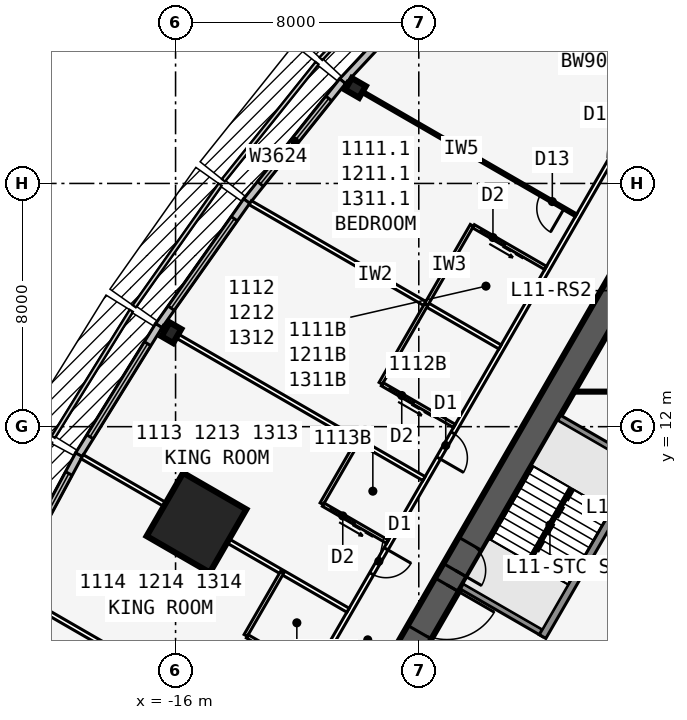
"""IFC4 building model, lengths in metres.
Left out: names, types, materials, properties, quantities, classifications, styles, units other than length and angle.
Written with IfcOpenShell. Run it as: python <this file> out.ifc"""

import sys

from ifc_helpers import new_model, si_unit, direction, frame, frame_2d, origin, origin_2d, place, context, subcontext, project, spatial, rectangle, i_section, extrude, element, fill, save


model = new_model("IFC4")
c1 = context("Model", 3, precision=1e-05, world=origin(), true_north=direction((0.0, 1.0)))
c2 = subcontext(c1, "Body", "Model", "MODEL_VIEW")
j1 = project(units=[si_unit("LENGTHUNIT", "METRE"), si_unit("PLANEANGLEUNIT", "RADIAN")], contexts=[c1])
p1 = place(None, origin())
s1 = spatial("IfcSite", under=j1, at=p1, CompositionType="ELEMENT")
p2 = place(p1, origin())
s2 = spatial("IfcBuilding", under=s1, at=p2, CompositionType="ELEMENT")
p3 = place(p2, frame((0.0, 0.0, 48.9)))
s3 = spatial("IfcBuildingStorey", under=s2, at=p3, CompositionType="ELEMENT", Elevation=48.9)
p4 = place(p3, frame((0.0, 19.052, 0.0), z_axis=(0.0, 0.0, 1.0), x_axis=(-0.499999749417, -0.866025548458, 0.0)))
e1 = element("IfcWall", 1, at=p4, inside=s3, PredefinedType="SHEAR", context=c2, shape_type="SweptSolid", body=[
    extrude(rectangle(XDim=33.0, YDim=0.9, at=frame_2d((16.5, 0.0))), origin(), (0.0, 0.0, 1.0), 3.4),
])
p5 = place(p4, frame((14.15, 0.0, 0.0)))
e2 = element("IfcOpeningElement", 2, at=p5, cuts=e1, PredefinedType="OPENING", context=c2, shape_type="SweptSolid", body=[
    extrude(rectangle(XDim=1.8, YDim=2.13, at=frame_2d((0.9, 1.065))), frame((0.0, 0.46, 0.0), z_axis=(0.0, -1.0, 0.0), x_axis=(1.0, 0.0, 0.0)), (0.0, 0.0, 1.0), 0.92),
])
p6 = place(p4, frame((12.6, 0.0, 0.0)))
e3 = element("IfcOpeningElement", 3, at=p6, cuts=e1, PredefinedType="OPENING", context=c2, shape_type="SweptSolid", body=[
    extrude(rectangle(XDim=1.0, YDim=2.13, at=frame_2d((0.5, 1.065))), frame((0.0, 0.46, 0.0), z_axis=(0.0, -1.0, 0.0), x_axis=(1.0, 0.0, 0.0)), (0.0, 0.0, 1.0), 0.92),
])
p7 = place(p3, frame((-0.062, 11.794, 0.0), z_axis=(0.0, 0.0, 1.0), x_axis=(-0.500006680225, -0.86602154692, 0.0)))
e4 = element("IfcWall", 4, at=p7, inside=s3, PredefinedType="SOLIDWALL", context=c2, shape_type="SweptSolid", body=[
    extrude(rectangle(XDim=7.733, YDim=0.25, at=frame_2d((3.866, 0.0))), origin(), (0.0, 0.0, 1.0), 3.235),
])
for number, where, z_axis, x_axis in (
    (5, (-0.679, 10.727, 0.0), (0.0, 0.0, 1.0), (-0.866, 0.5, 0.0)),
    (6, (-3.879, 5.184, 0.0), (0.0, 0.0, 1.0), (-0.866, 0.5, 0.0)),
):
    element("IfcWall", number, at=place(p3, frame(where, z_axis=z_axis, x_axis=x_axis)), inside=s3, PredefinedType="SOLIDWALL", context=c2, shape_type="SweptSolid", body=[
        extrude(rectangle(XDim=3.125, YDim=0.2, at=frame_2d((1.562, 0.0))), origin(), (0.0, 0.0, 1.0), 3.235),
    ])
for number, where, z_axis, x_axis in (
    (7, (-10.083, 23.142, 0.0), (0.0, 0.0, 1.0), (-0.5, -0.866, 0.0)),
    (8, (-16.137, 15.09, 0.0), (0.0, 0.0, 1.0), (-0.866, 0.5, 0.0)),
):
    element("IfcColumn", number, at=place(p3, frame(where, z_axis=z_axis, x_axis=x_axis)), inside=s3, PredefinedType="COLUMN", context=c2, shape_type="SweptSolid", body=[
        extrude(i_section(OverallWidth=0.442, OverallDepth=0.531, WebThickness=0.066, FlangeThickness=0.106, at=origin_2d()), origin(), (0.0, 0.0, 1.0), 3.4),
    ])
p8 = place(p3, frame((-15.312, 8.84, 0.0), z_axis=(0.0, 0.0, 1.0), x_axis=(-0.866025403784, 0.5, 0.0)))
e9 = element("IfcColumn", 9, at=p8, inside=s3, PredefinedType="COLUMN", context=c2, shape_type="SweptSolid", body=[
    extrude(rectangle(XDim=2.4, YDim=2.4, at=origin_2d()), origin(), (0.0, 0.0, 1.0), 3.4),
])
p9 = place(p3, frame((-4.909, 29.36, 0.0), z_axis=(0.0, 0.0, 1.0), x_axis=(-0.682289646561, -0.731081964075, 0.0)))
e10 = element("IfcWall", 10, at=p9, inside=s3, PredefinedType="STANDARD", context=c2, shape_type="SweptSolid", body=[
    extrude(rectangle(XDim=8.211, YDim=0.25, at=frame_2d((4.105, 0.0))), origin(), (0.0, 0.0, 1.0), 3.235),
])
p10 = place(p9, frame((2.006, 0.0, 0.45)))
e11 = element("IfcOpeningElement", 11, at=p10, cuts=e10, PredefinedType="OPENING", context=c2, shape_type="SweptSolid", body=[
    extrude(rectangle(XDim=4.2, YDim=2.4, at=frame_2d((2.1, 1.2))), frame((0.0, 0.135, 0.0), z_axis=(0.0, -1.0, 0.0), x_axis=(1.0, 0.0, 0.0)), (0.0, 0.0, 1.0), 0.27),
])
p11 = place(p3, frame((-10.505, 23.364, 0.0), z_axis=(0.0, 0.0, 1.0), x_axis=(-0.624594965756, -0.780948864364, 0.0)))
e12 = element("IfcWall", 12, at=p11, inside=s3, PredefinedType="STANDARD", context=c2, shape_type="SweptSolid", body=[
    extrude(rectangle(XDim=5.058, YDim=0.25, at=frame_2d((2.529, 0.0))), origin(), (0.0, 0.0, 1.0), 3.235),
])
p12 = place(p11, frame((0.729, 0.0, 0.45)))
e13 = element("IfcOpeningElement", 13, at=p12, cuts=e12, PredefinedType="OPENING", context=c2, shape_type="SweptSolid", body=[
    extrude(rectangle(XDim=3.6, YDim=2.4, at=frame_2d((1.8, 1.2))), frame((0.0, 0.135, 0.0), z_axis=(0.0, -1.0, 0.0), x_axis=(1.0, 0.0, 0.0)), (0.0, 0.0, 1.0), 0.27),
])
p13 = place(p3, frame((-13.659, 19.42, 0.0), z_axis=(0.0, 0.0, 1.0), x_axis=(-0.5766431066, -0.81699616132, 0.0)))
e14 = element("IfcWall", 14, at=p13, inside=s3, PredefinedType="STANDARD", context=c2, shape_type="SweptSolid", body=[
    extrude(rectangle(XDim=5.021, YDim=0.25, at=frame_2d((2.51, 0.0))), origin(), (0.0, 0.0, 1.0), 3.235),
])
p14 = place(p13, frame((0.71, 0.0, 0.45)))
e15 = element("IfcOpeningElement", 15, at=p14, cuts=e14, PredefinedType="OPENING", context=c2, shape_type="SweptSolid", body=[
    extrude(rectangle(XDim=3.6, YDim=2.4, at=frame_2d((1.8, 1.2))), frame((0.0, 0.135, 0.0), z_axis=(0.0, -1.0, 0.0), x_axis=(1.0, 0.0, 0.0)), (0.0, 0.0, 1.0), 0.27),
])
p15 = place(p3, frame((-16.551, 15.324, 0.0), z_axis=(0.0, 0.0, 1.0), x_axis=(-0.526132807704, -0.850402415717, 0.0)))
e16 = element("IfcWall", 16, at=p15, inside=s3, PredefinedType="STANDARD", context=c2, shape_type="SweptSolid", body=[
    extrude(rectangle(XDim=5.002, YDim=0.25, at=frame_2d((2.501, 0.0))), origin(), (0.0, 0.0, 1.0), 3.235),
])
p16 = place(p15, frame((0.701, 0.0, 0.45)))
e17 = element("IfcOpeningElement", 17, at=p16, cuts=e16, PredefinedType="OPENING", context=c2, shape_type="SweptSolid", body=[
    extrude(rectangle(XDim=3.6, YDim=2.4, at=frame_2d((1.8, 1.2))), frame((0.0, 0.135, 0.0), z_axis=(0.0, -1.0, 0.0), x_axis=(1.0, 0.0, 0.0)), (0.0, 0.0, 1.0), 0.27),
])
p17 = place(p3, frame((-19.178, 11.077, 0.0), z_axis=(0.0, 0.0, 1.0), x_axis=(-0.473412820489, -0.880840678782, 0.0)))
e18 = element("IfcWall", 18, at=p17, inside=s3, PredefinedType="STANDARD", context=c2, shape_type="SweptSolid", body=[
    extrude(rectangle(XDim=5.002, YDim=0.25, at=frame_2d((2.501, 0.0))), origin(), (0.0, 0.0, 1.0), 3.235),
])
p18 = place(p17, frame((0.701, 0.0, 0.45)))
e19 = element("IfcOpeningElement", 19, at=p18, cuts=e18, PredefinedType="OPENING", context=c2, shape_type="SweptSolid", body=[
    extrude(rectangle(XDim=3.6, YDim=2.4, at=frame_2d((1.8, 1.2))), frame((0.0, 0.135, 0.0), z_axis=(0.0, -1.0, 0.0), x_axis=(1.0, 0.0, 0.0)), (0.0, 0.0, 1.0), 0.27),
])
p19 = place(p3, frame((-0.5, 22.836, 0.0), z_axis=(0.0, 0.0, 1.0), x_axis=(-0.500001677587, -0.866024435227, 0.0)))
e20 = element("IfcWall", 20, at=p19, inside=s3, PredefinedType="PARTITIONING", context=c2, shape_type="SweptSolid", body=[
    extrude(rectangle(XDim=39.054, YDim=0.15, at=frame_2d((19.527, 0.0))), origin(), (0.0, 0.0, 1.0), 3.235),
])
p20 = place(p19, frame((1.558, 0.0, 0.0)))
e21 = element("IfcOpeningElement", 21, at=p20, cuts=e20, PredefinedType="OPENING", context=c2, shape_type="SweptSolid", body=[
    extrude(rectangle(XDim=0.95, YDim=2.13, at=frame_2d((0.475, 1.065))), frame((0.0, 0.085, 0.0), z_axis=(0.0, -1.0, 0.0), x_axis=(1.0, 0.0, 0.0)), (0.0, 0.0, 1.0), 0.17),
])
p21 = place(p19, frame((12.752, 0.0, 0.0)))
e22 = element("IfcOpeningElement", 22, at=p21, cuts=e20, PredefinedType="OPENING", context=c2, shape_type="SweptSolid", body=[
    extrude(rectangle(XDim=0.95, YDim=2.13, at=frame_2d((0.475, 1.065))), frame((0.0, 0.085, 0.0), z_axis=(0.0, -1.0, 0.0), x_axis=(1.0, 0.0, 0.0)), (0.0, 0.0, 1.0), 0.17),
])
p22 = place(p19, frame((17.152, 0.0, 0.0)))
e23 = element("IfcOpeningElement", 23, at=p22, cuts=e20, PredefinedType="OPENING", context=c2, shape_type="SweptSolid", body=[
    extrude(rectangle(XDim=0.95, YDim=2.13, at=frame_2d((0.475, 1.065))), frame((0.0, 0.085, 0.0), z_axis=(0.0, -1.0, 0.0), x_axis=(1.0, 0.0, 0.0)), (0.0, 0.0, 1.0), 0.17),
])
p23 = place(p19, frame((22.152, 0.0, 0.0)))
e24 = element("IfcOpeningElement", 24, at=p23, cuts=e20, PredefinedType="OPENING", context=c2, shape_type="SweptSolid", body=[
    extrude(rectangle(XDim=0.95, YDim=2.13, at=frame_2d((0.475, 1.065))), frame((0.0, 0.085, 0.0), z_axis=(0.0, -1.0, 0.0), x_axis=(1.0, 0.0, 0.0)), (0.0, 0.0, 1.0), 0.17),
])
p24 = place(p19, frame((27.152, 0.0, 0.0)))
e25 = element("IfcOpeningElement", 25, at=p24, cuts=e20, PredefinedType="OPENING", context=c2, shape_type="SweptSolid", body=[
    extrude(rectangle(XDim=0.95, YDim=2.13, at=frame_2d((0.475, 1.065))), frame((0.0, 0.085, 0.0), z_axis=(0.0, -1.0, 0.0), x_axis=(1.0, 0.0, 0.0)), (0.0, 0.0, 1.0), 0.17),
])
p25 = place(p19, frame((36.546, 0.0, 0.0)))
e26 = element("IfcOpeningElement", 26, at=p25, cuts=e20, PredefinedType="OPENING", context=c2, shape_type="SweptSolid", body=[
    extrude(rectangle(XDim=0.95, YDim=2.13, at=frame_2d((0.475, 1.065))), frame((0.0, 0.085, 0.0), z_axis=(0.0, -1.0, 0.0), x_axis=(1.0, 0.0, 0.0)), (0.0, 0.0, 1.0), 0.17),
])
p26 = place(p3, frame((-2.829, 18.954, 0.0), z_axis=(0.0, 0.0, 1.0), x_axis=(-0.866020536561, 0.500008430184, 0.0)))
e27 = element("IfcWall", 27, at=p26, inside=s3, PredefinedType="PARTITIONING", context=c2, shape_type="SweptSolid", body=[
    extrude(rectangle(XDim=8.72, YDim=0.1, at=frame_2d((4.36, 0.0))), origin(), (0.0, 0.0, 1.0), 2.389),
])
p27 = place(p26, frame((0.45, 0.0, 0.0)))
e28 = element("IfcOpeningElement", 28, at=p27, cuts=e27, PredefinedType="OPENING", context=c2, shape_type="SweptSolid", body=[
    extrude(rectangle(XDim=0.9, YDim=2.13, at=frame_2d((0.45, 1.065))), frame((0.0, 0.06, 0.0), z_axis=(0.0, -1.0, 0.0), x_axis=(1.0, 0.0, 0.0)), (0.0, 0.0, 1.0), 0.12),
])
p28 = place(p3, frame((-5.329, 14.623, 0.0), z_axis=(0.0, 0.0, 1.0), x_axis=(-0.866018409083, 0.500012114982, 0.0)))
e29 = element("IfcWall", 29, at=p28, inside=s3, PredefinedType="PARTITIONING", context=c2, shape_type="SweptSolid", body=[
    extrude(rectangle(XDim=9.485, YDim=0.15, at=frame_2d((4.742, 0.0))), origin(), (0.0, 0.0, 1.0), 2.389),
])
p29 = place(p3, frame((-7.829, 10.293, 0.0), z_axis=(0.0, 0.0, 1.0), x_axis=(-0.866016302457, 0.50001576363, 0.0)))
e30 = element("IfcWall", 30, at=p29, inside=s3, PredefinedType="PARTITIONING", context=c2, shape_type="SweptSolid", body=[
    extrude(rectangle(XDim=9.943, YDim=0.15, at=frame_2d((4.972, 0.0))), origin(), (0.0, 0.0, 1.0), 2.389),
])
p30 = place(p3, frame((-10.329, 5.963, 0.0), z_axis=(0.0, 0.0, 1.0), x_axis=(-0.866021688545, 0.500006434927, 0.0)))
e31 = element("IfcWall", 31, at=p30, inside=s3, PredefinedType="PARTITIONING", context=c2, shape_type="SweptSolid", body=[
    extrude(rectangle(XDim=10.096, YDim=0.15, at=frame_2d((5.048, 0.0))), origin(), (0.0, 0.0, 1.0), 2.389),
])
p31 = place(p3, frame((-12.829, 1.633, 0.0), z_axis=(0.0, 0.0, 1.0), x_axis=(-0.866026934769, 0.499997348248, 0.0)))
e32 = element("IfcWall", 32, at=p31, inside=s3, PredefinedType="PARTITIONING", context=c2, shape_type="SweptSolid", body=[
    extrude(rectangle(XDim=9.943, YDim=0.15, at=frame_2d((4.971, 0.0))), origin(), (0.0, 0.0, 1.0), 2.389),
])
p32 = place(p3, frame((-6.253, 18.622, 0.0), z_axis=(0.0, 0.0, 1.0), x_axis=(-0.499990139034, -0.866031096941, 0.0)))
e33 = element("IfcWall", 33, at=p32, inside=s3, PredefinedType="PLUMBINGWALL", context=c2, shape_type="SweptSolid", body=[
    extrude(rectangle(XDim=3.0, YDim=0.12, at=frame_2d((1.5, 0.0))), origin(), (0.0, 0.0, 1.0), 3.235),
])
p33 = place(p3, frame((-3.829, 17.221, 0.0), z_axis=(0.0, 0.0, 1.0), x_axis=(-0.865997131366, 0.500048966069, 0.0)))
e34 = element("IfcWall", 34, at=p33, inside=s3, PredefinedType="PLUMBINGWALL", context=c2, shape_type="SweptSolid", body=[
    extrude(rectangle(XDim=2.74, YDim=0.12, at=frame_2d((1.37, 0.0))), origin(), (0.0, 0.0, 1.0), 3.235),
])
p34 = place(p33, frame((1.55, 0.0, 0.0)))
e35 = element("IfcOpeningElement", 35, at=p34, cuts=e34, PredefinedType="OPENING", context=c2, shape_type="SweptSolid", body=[
    extrude(rectangle(XDim=0.9, YDim=2.13, at=frame_2d((0.45, 1.065))), frame((0.0, 0.07, 0.0), z_axis=(0.0, -1.0, 0.0), x_axis=(1.0, 0.0, 0.0)), (0.0, 0.0, 1.0), 0.14),
])
p35 = place(p3, frame((-7.753, 16.023, 0.0), z_axis=(0.0, 0.0, 1.0), x_axis=(-0.499990139034, -0.866031096941, 0.0)))
e36 = element("IfcWall", 36, at=p35, inside=s3, PredefinedType="PLUMBINGWALL", context=c2, shape_type="SweptSolid", body=[
    extrude(rectangle(XDim=3.0, YDim=0.12, at=frame_2d((1.5, 0.0))), origin(), (0.0, 0.0, 1.0), 3.235),
])
p36 = place(p3, frame((-6.829, 12.025, 0.0), z_axis=(0.0, 0.0, 1.0), x_axis=(-0.866035715982, 0.499982138324, 0.0)))
e37 = element("IfcWall", 37, at=p36, inside=s3, PredefinedType="PLUMBINGWALL", context=c2, shape_type="SweptSolid", body=[
    extrude(rectangle(XDim=2.74, YDim=0.12, at=frame_2d((1.37, 0.0))), origin(), (0.0, 0.0, 1.0), 3.235),
])
p37 = place(p36, frame((1.55, 0.0, 0.0)))
e38 = element("IfcOpeningElement", 38, at=p37, cuts=e37, PredefinedType="OPENING", context=c2, shape_type="SweptSolid", body=[
    extrude(rectangle(XDim=0.9, YDim=2.13, at=frame_2d((0.45, 1.065))), frame((0.0, 0.07, 0.0), z_axis=(0.0, -1.0, 0.0), x_axis=(1.0, 0.0, 0.0)), (0.0, 0.0, 1.0), 0.14),
])
p38 = place(p3, frame((-9.993, 11.543, 0.0), z_axis=(0.0, 0.0, 1.0), x_axis=(-0.500077600433, -0.865980596518, 0.0)))
e39 = element("IfcWall", 39, at=p38, inside=s3, PredefinedType="PLUMBINGWALL", context=c2, shape_type="SweptSolid", body=[
    extrude(rectangle(XDim=2.4, YDim=0.12, at=frame_2d((1.2, 0.0))), origin(), (0.0, 0.0, 1.0), 3.235),
])
p39 = place(p3, frame((-9.029, 8.215, 0.0), z_axis=(0.0, 0.0, 1.0), x_axis=(-0.866023955769, 0.500002508028, 0.0)))
e40 = element("IfcWall", 40, at=p39, inside=s3, PredefinedType="PLUMBINGWALL", context=c2, shape_type="SweptSolid", body=[
    extrude(rectangle(XDim=2.44, YDim=0.12, at=frame_2d((1.22, 0.0))), origin(), (0.0, 0.0, 1.0), 3.235),
])
p40 = place(p39, frame((1.25, 0.0, 0.0)))
e41 = element("IfcOpeningElement", 41, at=p40, cuts=e40, PredefinedType="OPENING", context=c2, shape_type="SweptSolid", body=[
    extrude(rectangle(XDim=0.9, YDim=2.13, at=frame_2d((0.45, 1.065))), frame((0.0, 0.07, 0.0), z_axis=(0.0, -1.0, 0.0), x_axis=(1.0, 0.0, 0.0)), (0.0, 0.0, 1.0), 0.14),
])
p41 = place(p3, frame((-12.493, 7.213, 0.0), z_axis=(0.0, 0.0, 1.0), x_axis=(-0.500077600433, -0.865980596518, 0.0)))
e42 = element("IfcWall", 42, at=p41, inside=s3, PredefinedType="PLUMBINGWALL", context=c2, shape_type="SweptSolid", body=[
    extrude(rectangle(XDim=2.4, YDim=0.12, at=frame_2d((1.2, 0.0))), origin(), (0.0, 0.0, 1.0), 3.235),
])
p42 = place(p3, frame((-11.529, 3.885, 0.0), z_axis=(0.0, 0.0, 1.0), x_axis=(-0.866023955769, 0.500002508028, 0.0)))
e43 = element("IfcWall", 43, at=p42, inside=s3, PredefinedType="PLUMBINGWALL", context=c2, shape_type="SweptSolid", body=[
    extrude(rectangle(XDim=2.44, YDim=0.12, at=frame_2d((1.22, 0.0))), origin(), (0.0, 0.0, 1.0), 3.235),
])
p43 = place(p42, frame((1.25, 0.0, 0.0)))
e44 = element("IfcOpeningElement", 44, at=p43, cuts=e43, PredefinedType="OPENING", context=c2, shape_type="SweptSolid", body=[
    extrude(rectangle(XDim=0.9, YDim=2.13, at=frame_2d((0.45, 1.065))), frame((0.0, 0.07, 0.0), z_axis=(0.0, -1.0, 0.0), x_axis=(1.0, 0.0, 0.0)), (0.0, 0.0, 1.0), 0.14),
])
p44 = place(p3, frame((-2.887, 13.153, 0.0), z_axis=(0.0, 0.0, 1.0), x_axis=(1.0, 0.0, 0.0)))
e45 = element("IfcWall", 45, at=p44, inside=s3, PredefinedType="PARTITIONING", context=c2, shape_type="SweptSolid", body=[
    extrude(rectangle(XDim=5.773, YDim=0.1, at=frame_2d((2.887, 0.0))), origin(), (0.0, 0.0, 1.0), 3.235),
])
p45 = place(p44, frame((2.437, 0.0, 0.0)))
e46 = element("IfcOpeningElement", 46, at=p45, cuts=e45, PredefinedType="OPENING", context=c2, shape_type="SweptSolid", body=[
    extrude(rectangle(XDim=0.9, YDim=2.13, at=frame_2d((0.45, 1.065))), frame((0.0, 0.06, 0.0), z_axis=(0.0, -1.0, 0.0), x_axis=(1.0, 0.0, 0.0)), (0.0, 0.0, 1.0), 0.12),
])
p46 = place(p3, frame((-2.988, 9.978, 0.0), z_axis=(0.0, 0.0, 1.0), x_axis=(-0.499992232847, -0.866029888106, 0.0)))
e47 = element("IfcWall", 47, at=p46, inside=s3, PredefinedType="SOLIDWALL", context=c2, shape_type="SweptSolid", body=[
    extrude(rectangle(XDim=2.794, YDim=0.1, at=frame_2d((1.397, 0.0))), origin(), (0.0, 0.0, 1.0), 3.4),
])
p47 = place(p12, origin())
e48 = element("IfcWindow", 48, at=p47, inside=s3, PartitioningType="SINGLE_PANEL", PredefinedType="WINDOW", context=c2, shape_type="SweptSolid", body=[
    extrude(rectangle(XDim=3.6, YDim=2.4, at=frame_2d((1.8, 1.2))), frame((0.0, 0.03, 0.0), z_axis=(0.0, -1.0, 0.0), x_axis=(1.0, 0.0, 0.0)), (0.0, 0.0, 1.0), 0.06),
])
fill(e13, e48)
p48 = place(p14, origin())
e49 = element("IfcWindow", 49, at=p48, inside=s3, PartitioningType="SINGLE_PANEL", PredefinedType="WINDOW", context=c2, shape_type="SweptSolid", body=[
    extrude(rectangle(XDim=3.6, YDim=2.4, at=frame_2d((1.8, 1.2))), frame((0.0, 0.03, 0.0), z_axis=(0.0, -1.0, 0.0), x_axis=(1.0, 0.0, 0.0)), (0.0, 0.0, 1.0), 0.06),
])
fill(e15, e49)
p49 = place(p16, origin())
e50 = element("IfcWindow", 50, at=p49, inside=s3, PartitioningType="SINGLE_PANEL", PredefinedType="WINDOW", context=c2, shape_type="SweptSolid", body=[
    extrude(rectangle(XDim=3.6, YDim=2.4, at=frame_2d((1.8, 1.2))), frame((0.0, 0.03, 0.0), z_axis=(0.0, -1.0, 0.0), x_axis=(1.0, 0.0, 0.0)), (0.0, 0.0, 1.0), 0.06),
])
fill(e17, e50)
p50 = place(p18, origin())
e51 = element("IfcWindow", 51, at=p50, inside=s3, PartitioningType="SINGLE_PANEL", PredefinedType="WINDOW", context=c2, shape_type="SweptSolid", body=[
    extrude(rectangle(XDim=3.6, YDim=2.4, at=frame_2d((1.8, 1.2))), frame((0.0, 0.03, 0.0), z_axis=(0.0, -1.0, 0.0), x_axis=(1.0, 0.0, 0.0)), (0.0, 0.0, 1.0), 0.06),
])
fill(e19, e51)
p51 = place(p27, origin())
e52 = element("IfcDoor", 52, at=p51, inside=s3, OperationType="SINGLE_SWING_LEFT", PredefinedType="DOOR", context=c2, shape_type="SweptSolid", body=[
    extrude(rectangle(XDim=0.9, YDim=2.13, at=frame_2d((0.45, 1.065))), frame((0.0, 0.025, 0.0), z_axis=(0.0, -1.0, 0.0), x_axis=(1.0, 0.0, 0.0)), (0.0, 0.0, 1.0), 0.05),
])
fill(e28, e52)
p52 = place(p34, origin())
e53 = element("IfcDoor", 53, at=p52, inside=s3, OperationType="SLIDING_TO_LEFT", PredefinedType="DOOR", context=c2, shape_type="SweptSolid", body=[
    extrude(rectangle(XDim=0.9, YDim=2.13, at=frame_2d((0.45, 1.065))), frame((0.0, 0.025, 0.0), z_axis=(0.0, -1.0, 0.0), x_axis=(1.0, 0.0, 0.0)), (0.0, 0.0, 1.0), 0.05),
])
fill(e35, e53)
p53 = place(p37, origin())
e54 = element("IfcDoor", 54, at=p53, inside=s3, OperationType="SLIDING_TO_LEFT", PredefinedType="DOOR", context=c2, shape_type="SweptSolid", body=[
    extrude(rectangle(XDim=0.9, YDim=2.13, at=frame_2d((0.45, 1.065))), frame((0.0, 0.025, 0.0), z_axis=(0.0, -1.0, 0.0), x_axis=(1.0, 0.0, 0.0)), (0.0, 0.0, 1.0), 0.05),
])
fill(e38, e54)
p54 = place(p21, origin())
e55 = element("IfcDoor", 55, at=p54, inside=s3, OperationType="SINGLE_SWING_RIGHT", PredefinedType="DOOR", context=c2, shape_type="SweptSolid", body=[
    extrude(rectangle(XDim=0.95, YDim=2.13, at=frame_2d((0.475, 1.065))), frame((0.0, 0.025, 0.0), z_axis=(0.0, -1.0, 0.0), x_axis=(1.0, 0.0, 0.0)), (0.0, 0.0, 1.0), 0.05),
])
fill(e22, e55)
p55 = place(p40, origin())
e56 = element("IfcDoor", 56, at=p55, inside=s3, OperationType="SLIDING_TO_LEFT", PredefinedType="DOOR", context=c2, shape_type="SweptSolid", body=[
    extrude(rectangle(XDim=0.9, YDim=2.13, at=frame_2d((0.45, 1.065))), frame((0.0, 0.025, 0.0), z_axis=(0.0, -1.0, 0.0), x_axis=(1.0, 0.0, 0.0)), (0.0, 0.0, 1.0), 0.05),
])
fill(e41, e56)
p56 = place(p22, origin())
e57 = element("IfcDoor", 57, at=p56, inside=s3, OperationType="SINGLE_SWING_LEFT", PredefinedType="DOOR", context=c2, shape_type="SweptSolid", body=[
    extrude(rectangle(XDim=0.95, YDim=2.13, at=frame_2d((0.475, 1.065))), frame((0.0, 0.025, 0.0), z_axis=(0.0, -1.0, 0.0), x_axis=(1.0, 0.0, 0.0)), (0.0, 0.0, 1.0), 0.05),
])
fill(e23, e57)
p57 = place(p43, origin())
e58 = element("IfcDoor", 58, at=p57, inside=s3, OperationType="SLIDING_TO_LEFT", PredefinedType="DOOR", context=c2, shape_type="SweptSolid", body=[
    extrude(rectangle(XDim=0.9, YDim=2.13, at=frame_2d((0.45, 1.065))), frame((0.0, 0.025, 0.0), z_axis=(0.0, -1.0, 0.0), x_axis=(1.0, 0.0, 0.0)), (0.0, 0.0, 1.0), 0.05),
])
fill(e44, e58)
p58 = place(p5, origin())
e59 = element("IfcDoor", 59, at=p58, inside=s3, OperationType="DOUBLE_DOOR_SINGLE_SWING", PredefinedType="DOOR", context=c2, shape_type="SweptSolid", body=[
    extrude(rectangle(XDim=1.8, YDim=2.13, at=frame_2d((0.9, 1.065))), frame((0.0, 0.025, 0.0), z_axis=(0.0, -1.0, 0.0), x_axis=(1.0, 0.0, 0.0)), (0.0, 0.0, 1.0), 0.05),
])
fill(e2, e59)
p59 = place(p6, origin())
e60 = element("IfcDoor", 60, at=p59, inside=s3, OperationType="SINGLE_SWING_RIGHT", PredefinedType="DOOR", context=c2, shape_type="SweptSolid", body=[
    extrude(rectangle(XDim=1.0, YDim=2.13, at=frame_2d((0.5, 1.065))), frame((0.0, 0.025, 0.0), z_axis=(0.0, -1.0, 0.0), x_axis=(1.0, 0.0, 0.0)), (0.0, 0.0, 1.0), 0.05),
])
fill(e3, e60)
save(model, sys.argv[1])
